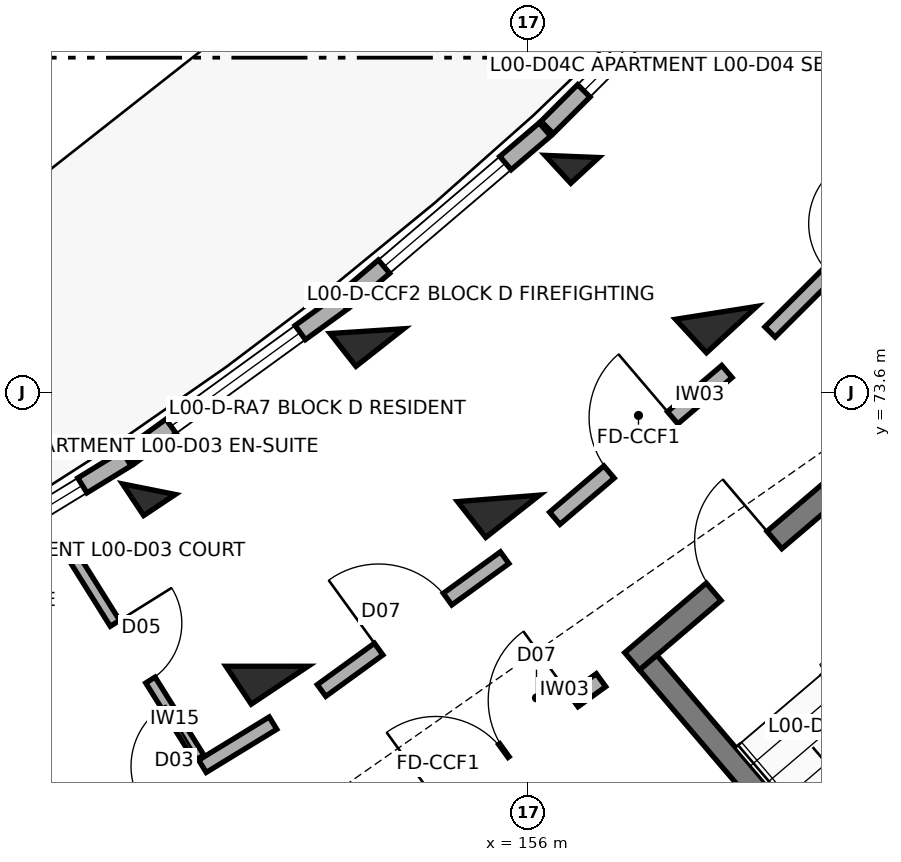
"""IFC4 building model, lengths in metres.
Left out: names, types, materials, properties, quantities, classifications, styles, units other than length and angle.
Written with IfcOpenShell. Run it as: python <this file> out.ifc"""

import sys

from ifc_helpers import new_model, si_unit, direction, frame, frame_2d, origin, origin_2d, place, context, subcontext, project, spatial, rectangle, extrude, element, fill, save


model = new_model("IFC4")
c1 = context("Model", 3, precision=1e-05, world=origin(), true_north=direction((0.0, 1.0)))
c2 = subcontext(c1, "Body", "Model", "MODEL_VIEW")
j1 = project(units=[si_unit("LENGTHUNIT", "METRE"), si_unit("PLANEANGLEUNIT", "RADIAN")], contexts=[c1])
p1 = place(None, origin())
s1 = spatial("IfcSite", under=j1, at=p1, CompositionType="ELEMENT")
p2 = place(p1, origin())
s2 = spatial("IfcBuilding", under=s1, at=p2, CompositionType="ELEMENT")
p3 = place(p2, origin())
s3 = spatial("IfcBuildingStorey", under=s2, at=p3, CompositionType="ELEMENT", Elevation=0.0)
p4 = place(p3, frame((149.358, 68.03, 0.0), z_axis=(0.0, 0.0, 1.0), x_axis=(0.487859659139, -0.87292207727, 0.0)))
e1 = element("IfcColumn", 1, at=p4, inside=s3, PredefinedType="COLUMN", context=c2, shape_type="SweptSolid", body=[
    extrude(rectangle(XDim=0.6, YDim=0.9, at=origin_2d()), origin(), (0.0, 0.0, 1.0), 4.5),
])
p5 = place(p3, frame((151.015, 72.322, 0.0), z_axis=(0.0, 0.0, 1.0), x_axis=(0.554844427448, -0.83195412213, 0.0)))
e2 = element("IfcColumn", 2, at=p5, inside=s3, PredefinedType="COLUMN", context=c2, shape_type="SweptSolid", body=[
    extrude(rectangle(XDim=0.5, YDim=0.5, at=origin_2d()), origin(), (0.0, 0.0, 1.0), 4.5),
])
p6 = place(p3, frame((152.568, 69.993, 0.0), z_axis=(0.0, 0.0, 1.0), x_axis=(0.554844427448, -0.83195412213, 0.0)))
e3 = element("IfcColumn", 3, at=p6, inside=s3, PredefinedType="COLUMN", context=c2, shape_type="SweptSolid", body=[
    extrude(rectangle(XDim=0.6, YDim=0.9, at=origin_2d()), origin(), (0.0, 0.0, 1.0), 4.5),
])
p7 = place(p3, frame((153.883, 74.402, 0.0), z_axis=(0.0, 0.0, 1.0), x_axis=(0.618408395358, -0.785856893175, 0.0)))
e4 = element("IfcColumn", 4, at=p7, inside=s3, PredefinedType="COLUMN", context=c2, shape_type="SweptSolid", body=[
    extrude(rectangle(XDim=0.55, YDim=0.8, at=origin_2d()), origin(), (0.0, 0.0, 1.0), 4.5),
])
p8 = place(p3, frame((155.614, 72.202, 0.0), z_axis=(0.0, 0.0, 1.0), x_axis=(0.618408395358, -0.785856893175, 0.0)))
e5 = element("IfcColumn", 5, at=p8, inside=s3, PredefinedType="COLUMN", context=c2, shape_type="SweptSolid", body=[
    extrude(rectangle(XDim=0.6, YDim=0.9, at=origin_2d()), origin(), (0.0, 0.0, 1.0), 4.5),
])
p9 = place(p3, frame((156.579, 76.701, 0.0), z_axis=(0.0, 0.0, 1.0), x_axis=(0.678159669868, -0.73491459515, 0.0)))
e6 = element("IfcColumn", 6, at=p9, inside=s3, PredefinedType="COLUMN", context=c2, shape_type="SweptSolid", body=[
    extrude(rectangle(XDim=0.5, YDim=0.5, at=origin_2d()), origin(), (0.0, 0.0, 1.0), 4.5),
])
p10 = place(p3, frame((158.477, 74.643, 0.0), z_axis=(0.0, 0.0, 1.0), x_axis=(0.678159669868, -0.73491459515, 0.0)))
e7 = element("IfcColumn", 7, at=p10, inside=s3, PredefinedType="COLUMN", context=c2, shape_type="SweptSolid", body=[
    extrude(rectangle(XDim=0.6, YDim=0.9, at=origin_2d()), origin(), (0.0, 0.0, 1.0), 4.5),
])
p11 = place(p3, frame((147.765, 70.921, 0.0), z_axis=(0.0, 0.0, 1.0), x_axis=(0.85310231885, 0.521743647371, 0.0)))
e8 = element("IfcWall", 8, at=p11, inside=s3, PredefinedType="SOLIDWALL", context=c2, shape_type="SweptSolid", body=[
    extrude(rectangle(XDim=3.464, YDim=0.23, at=frame_2d((1.732, 0.0))), origin(), (0.0, 0.0, 1.0), 3.45),
])
p12 = place(p11, frame((0.682, 0.0, 0.32)))
e9 = element("IfcOpeningElement", 9, at=p12, cuts=e8, PredefinedType="OPENING", context=c2, shape_type="SweptSolid", body=[
    extrude(rectangle(XDim=2.1, YDim=1.65, at=frame_2d((1.05, 0.825))), frame((0.0, 0.125, 0.0), z_axis=(0.0, -1.0, 0.0), x_axis=(1.0, 0.0, 0.0)), (0.0, 0.0, 1.0), 0.25),
])
p13 = place(p3, frame((150.753, 72.75, 0.0), z_axis=(0.0, 0.0, 1.0), x_axis=(0.809540089106, 0.587064599623, 0.0)))
e10 = element("IfcWall", 10, at=p13, inside=s3, PredefinedType="SOLIDWALL", context=c2, shape_type="SweptSolid", body=[
    extrude(rectangle(XDim=3.463, YDim=0.23, at=frame_2d((1.732, 0.0))), origin(), (0.0, 0.0, 1.0), 3.45),
])
p14 = place(p13, frame((0.682, 0.0, 0.32)))
e11 = element("IfcOpeningElement", 11, at=p14, cuts=e10, PredefinedType="OPENING", context=c2, shape_type="SweptSolid", body=[
    extrude(rectangle(XDim=2.1, YDim=1.65, at=frame_2d((1.05, 0.825))), frame((0.0, 0.125, 0.0), z_axis=(0.0, -1.0, 0.0), x_axis=(1.0, 0.0, 0.0)), (0.0, 0.0, 1.0), 0.25),
])
p15 = place(p3, frame((153.589, 74.808, 0.0), z_axis=(0.0, 0.0, 1.0), x_axis=(0.760985425115, 0.648768974876, 0.0)))
e12 = element("IfcWall", 12, at=p15, inside=s3, PredefinedType="SOLIDWALL", context=c2, shape_type="SweptSolid", body=[
    extrude(rectangle(XDim=3.464, YDim=0.23, at=frame_2d((1.732, 0.0))), origin(), (0.0, 0.0, 1.0), 3.45),
])
p16 = place(p15, frame((0.682, 0.0, 0.32)))
e13 = element("IfcOpeningElement", 13, at=p16, cuts=e12, PredefinedType="OPENING", context=c2, shape_type="SweptSolid", body=[
    extrude(rectangle(XDim=2.1, YDim=1.65, at=frame_2d((1.05, 0.825))), frame((0.0, 0.125, 0.0), z_axis=(0.0, -1.0, 0.0), x_axis=(1.0, 0.0, 0.0)), (0.0, 0.0, 1.0), 0.25),
])
p17 = place(p3, frame((156.254, 77.082, 0.0), z_axis=(0.0, 0.0, 1.0), x_axis=(0.707705680562, 0.70650737413, 0.0)))
e14 = element("IfcWall", 14, at=p17, inside=s3, PredefinedType="SOLIDWALL", context=c2, shape_type="SweptSolid", body=[
    extrude(rectangle(XDim=3.464, YDim=0.23, at=frame_2d((1.732, 0.0))), origin(), (0.0, 0.0, 1.0), 3.45),
])
p18 = place(p17, frame((0.682, 0.0, 0.32)))
e15 = element("IfcOpeningElement", 15, at=p18, cuts=e14, PredefinedType="OPENING", context=c2, shape_type="SweptSolid", body=[
    extrude(rectangle(XDim=2.1, YDim=1.65, at=frame_2d((1.05, 0.825))), frame((0.0, 0.125, 0.0), z_axis=(0.0, -1.0, 0.0), x_axis=(1.0, 0.0, 0.0)), (0.0, 0.0, 1.0), 0.25),
])
p19 = place(p3, frame((159.262, 79.041, 0.0), z_axis=(0.0, 0.0, 1.0), x_axis=(0.733738684326, -0.679431779595, 0.0)))
e16 = element("IfcWall", 16, at=p19, inside=s3, PredefinedType="SOLIDWALL", context=c2, shape_type="SweptSolid", body=[
    extrude(rectangle(XDim=8.2, YDim=0.265, at=frame_2d((4.1, 0.0))), origin(), (0.0, 0.0, 1.0), 3.34),
])
p20 = place(p19, frame((3.49, 0.0, 0.0)))
e17 = element("IfcOpeningElement", 17, at=p20, cuts=e16, PredefinedType="OPENING", context=c2, shape_type="SweptSolid", body=[
    extrude(rectangle(XDim=1.5, YDim=2.2, at=frame_2d((0.75, 1.1))), frame((0.0, 0.142, 0.0), z_axis=(0.0, -1.0, 0.0), x_axis=(1.0, 0.0, 0.0)), (0.0, 0.0, 1.0), 0.285),
])
p21 = place(p3, frame((157.372, 70.058, 0.0), z_axis=(0.0, 0.0, 1.0), x_axis=(0.760990583254, 0.648762924495, 0.0)))
e18 = element("IfcWall", 18, at=p21, inside=s3, PredefinedType="SHEAR", context=c2, shape_type="SweptSolid", body=[
    extrude(rectangle(XDim=3.87, YDim=0.3, at=frame_2d((1.935, 0.0))), origin(), (0.0, 0.0, 1.0), 4.5),
])
p22 = place(p21, frame((1.41, 0.0, 0.0)))
e19 = element("IfcOpeningElement", 19, at=p22, cuts=e18, PredefinedType="OPENING", context=c2, shape_type="SweptSolid", body=[
    extrude(rectangle(XDim=1.05, YDim=2.15, at=frame_2d((0.525, 1.075))), frame((0.0, 0.16, 0.0), z_axis=(0.0, -1.0, 0.0), x_axis=(1.0, 0.0, 0.0)), (0.0, 0.0, 1.0), 0.32),
])
p23 = place(p3, frame((157.583, 70.041, 0.0), z_axis=(0.0, 0.0, 1.0), x_axis=(0.648762810187, -0.760990680704, 0.0)))
e20 = element("IfcWall", 20, at=p23, inside=s3, PredefinedType="SHEAR", context=c2, shape_type="SweptSolid", body=[
    extrude(rectangle(XDim=7.69, YDim=0.3, at=frame_2d((3.845, 0.0))), origin(), (0.0, 0.0, 1.0), 4.5),
])
p24 = place(p3, frame((149.989, 67.619, 0.0), z_axis=(0.0, 0.0, 1.0), x_axis=(0.853121049608, 0.5217130195, 0.0)))
e21 = element("IfcWall", 21, at=p24, inside=s3, PredefinedType="SOLIDWALL", context=c2, shape_type="SweptSolid", body=[
    extrude(rectangle(XDim=3.116, YDim=0.19, at=frame_2d((1.558, 0.0))), origin(), (0.0, 0.0, 1.0), 3.34),
])
p25 = place(p24, frame((1.088, 0.0, 0.0)))
e22 = element("IfcOpeningElement", 22, at=p25, cuts=e21, PredefinedType="OPENING", context=c2, shape_type="SweptSolid", body=[
    extrude(rectangle(XDim=0.94, YDim=2.1, at=frame_2d((0.47, 1.05))), frame((0.0, 0.105, 0.0), z_axis=(0.0, -1.0, 0.0), x_axis=(1.0, 0.0, 0.0)), (0.0, 0.0, 1.0), 0.21),
])
p26 = place(p3, frame((149.926, 71.583, 0.0), z_axis=(0.0, 0.0, 1.0), x_axis=(0.5303779416, -0.847761310196, 0.0)))
e23 = element("IfcWall", 23, at=p26, inside=s3, PredefinedType="PARTITIONING", context=c2, shape_type="SweptSolid", body=[
    extrude(rectangle(XDim=3.3, YDim=0.145, at=frame_2d((1.65, 0.0))), origin(), (0.0, 0.0, 1.0), 3.34),
])
p27 = place(p26, frame((1.21, 0.0, 0.0)))
e24 = element("IfcOpeningElement", 24, at=p27, cuts=e23, PredefinedType="OPENING", context=c2, shape_type="SweptSolid", body=[
    extrude(rectangle(XDim=0.88, YDim=2.1, at=frame_2d((0.44, 1.05))), frame((0.0, 0.083, 0.0), z_axis=(0.0, -1.0, 0.0), x_axis=(1.0, 0.0, 0.0)), (0.0, 0.0, 1.0), 0.165),
])
p28 = place(p3, frame((154.423, 67.968, 0.0), z_axis=(0.0, 0.0, 1.0), x_axis=(0.809516127005, 0.587097641043, 0.0)))
e25 = element("IfcWall", 25, at=p28, inside=s3, PredefinedType="SOLIDWALL", context=c2, shape_type="SweptSolid", body=[
    extrude(rectangle(XDim=3.137, YDim=0.21, at=frame_2d((1.569, 0.0))), origin(), (0.0, 0.0, 1.0), 3.34),
])
p29 = place(p28, frame((0.45, 0.0, 0.0)))
e26 = element("IfcOpeningElement", 26, at=p29, cuts=e25, PredefinedType="OPENING", context=c2, shape_type="SweptSolid", body=[
    extrude(rectangle(XDim=1.1, YDim=2.15, at=frame_2d((0.55, 1.075))), frame((0.0, 0.115, 0.0), z_axis=(0.0, -1.0, 0.0), x_axis=(1.0, 0.0, 0.0)), (0.0, 0.0, 1.0), 0.23),
])
p30 = place(p28, frame((1.567, 0.0, 0.0)))
e27 = element("IfcOpeningElement", 27, at=p30, cuts=e25, PredefinedType="OPENING", context=c2, shape_type="SweptSolid", body=[
    extrude(rectangle(XDim=1.12, YDim=2.15, at=frame_2d((0.56, 1.075))), frame((0.0, 0.115, 0.0), z_axis=(0.0, -1.0, 0.0), x_axis=(1.0, 0.0, 0.0)), (0.0, 0.0, 1.0), 0.23),
])
p31 = place(p3, frame((153.285, 69.674, 0.0), z_axis=(0.0, 0.0, 1.0), x_axis=(0.809505174959, 0.587112741911, 0.0)))
e28 = element("IfcWall", 28, at=p31, inside=s3, PredefinedType="SOLIDWALL", context=c2, shape_type="SweptSolid", body=[
    extrude(rectangle(XDim=2.976, YDim=0.19, at=frame_2d((1.488, 0.0))), origin(), (0.0, 0.0, 1.0), 3.34),
])
p32 = place(p31, frame((0.928, 0.0, 0.0)))
e29 = element("IfcOpeningElement", 29, at=p32, cuts=e28, PredefinedType="OPENING", context=c2, shape_type="SweptSolid", body=[
    extrude(rectangle(XDim=1.12, YDim=2.15, at=frame_2d((0.56, 1.075))), frame((0.0, 0.105, 0.0), z_axis=(0.0, -1.0, 0.0), x_axis=(1.0, 0.0, 0.0)), (0.0, 0.0, 1.0), 0.21),
])
p33 = place(p3, frame((156.354, 71.94, 0.0), z_axis=(0.0, 0.0, 1.0), x_axis=(0.760991187621, 0.648762215579, 0.0)))
e30 = element("IfcWall", 30, at=p33, inside=s3, PredefinedType="SOLIDWALL", context=c2, shape_type="SweptSolid", body=[
    extrude(rectangle(XDim=2.976, YDim=0.21, at=frame_2d((1.488, 0.0))), origin(), (0.0, 0.0, 1.0), 3.34),
])
p34 = place(p33, frame((0.938, 0.0, 0.0)))
e31 = element("IfcOpeningElement", 31, at=p34, cuts=e30, PredefinedType="OPENING", context=c2, shape_type="SweptSolid", body=[
    extrude(rectangle(XDim=1.1, YDim=2.15, at=frame_2d((0.55, 1.075))), frame((0.0, 0.115, 0.0), z_axis=(0.0, -1.0, 0.0), x_axis=(1.0, 0.0, 0.0)), (0.0, 0.0, 1.0), 0.23),
])
p35 = place(p3, frame((159.186, 74.39, 0.0), z_axis=(0.0, 0.0, 1.0), x_axis=(0.70773330139, 0.706479705373, 0.0)))
e32 = element("IfcWall", 32, at=p35, inside=s3, PredefinedType="SOLIDWALL", context=c2, shape_type="SweptSolid", body=[
    extrude(rectangle(XDim=3.116, YDim=0.19, at=frame_2d((1.558, 0.0))), origin(), (0.0, 0.0, 1.0), 3.34),
])
p36 = place(p35, frame((1.098, 0.0, 0.0)))
e33 = element("IfcOpeningElement", 33, at=p36, cuts=e32, PredefinedType="OPENING", context=c2, shape_type="SweptSolid", body=[
    extrude(rectangle(XDim=0.92, YDim=2.1, at=frame_2d((0.46, 1.05))), frame((0.0, 0.105, 0.0), z_axis=(0.0, -1.0, 0.0), x_axis=(1.0, 0.0, 0.0)), (0.0, 0.0, 1.0), 0.21),
])
p37 = place(p12, origin())
e34 = element("IfcWindow", 34, at=p37, inside=s3, PartitioningType="TRIPLE_PANEL_VERTICAL", PredefinedType="WINDOW", context=c2, shape_type="SweptSolid", body=[
    extrude(rectangle(XDim=2.1, YDim=1.65, at=frame_2d((1.05, 0.825))), frame((0.0, 0.03, 0.0), z_axis=(0.0, -1.0, 0.0), x_axis=(1.0, 0.0, 0.0)), (0.0, 0.0, 1.0), 0.06),
])
fill(e9, e34)
p38 = place(p14, origin())
e35 = element("IfcWindow", 35, at=p38, inside=s3, PartitioningType="TRIPLE_PANEL_VERTICAL", PredefinedType="WINDOW", context=c2, shape_type="SweptSolid", body=[
    extrude(rectangle(XDim=2.1, YDim=1.65, at=frame_2d((1.05, 0.825))), frame((0.0, 0.03, 0.0), z_axis=(0.0, -1.0, 0.0), x_axis=(1.0, 0.0, 0.0)), (0.0, 0.0, 1.0), 0.06),
])
fill(e11, e35)
p39 = place(p16, origin())
e36 = element("IfcWindow", 36, at=p39, inside=s3, PartitioningType="TRIPLE_PANEL_VERTICAL", PredefinedType="WINDOW", context=c2, shape_type="SweptSolid", body=[
    extrude(rectangle(XDim=2.1, YDim=1.65, at=frame_2d((1.05, 0.825))), frame((0.0, 0.03, 0.0), z_axis=(0.0, -1.0, 0.0), x_axis=(1.0, 0.0, 0.0)), (0.0, 0.0, 1.0), 0.06),
])
fill(e13, e36)
p40 = place(p18, origin())
e37 = element("IfcWindow", 37, at=p40, inside=s3, PartitioningType="TRIPLE_PANEL_VERTICAL", PredefinedType="WINDOW", context=c2, shape_type="SweptSolid", body=[
    extrude(rectangle(XDim=2.1, YDim=1.65, at=frame_2d((1.05, 0.825))), frame((0.0, 0.03, 0.0), z_axis=(0.0, -1.0, 0.0), x_axis=(1.0, 0.0, 0.0)), (0.0, 0.0, 1.0), 0.06),
])
fill(e15, e37)
p41 = place(p22, origin())
e38 = element("IfcDoor", 38, at=p41, inside=s3, OperationType="SINGLE_SWING_RIGHT", PredefinedType="DOOR", context=c2, shape_type="SweptSolid", body=[
    extrude(rectangle(XDim=1.05, YDim=2.15, at=frame_2d((0.525, 1.075))), frame((0.0, 0.025, 0.0), z_axis=(0.0, -1.0, 0.0), x_axis=(1.0, 0.0, 0.0)), (0.0, 0.0, 1.0), 0.05),
])
fill(e19, e38)
p42 = place(p25, origin())
e39 = element("IfcDoor", 39, at=p42, inside=s3, OperationType="SINGLE_SWING_RIGHT", PredefinedType="DOOR", context=c2, shape_type="SweptSolid", body=[
    extrude(rectangle(XDim=0.94, YDim=2.1, at=frame_2d((0.47, 1.05))), frame((0.0, 0.025, 0.0), z_axis=(0.0, -1.0, 0.0), x_axis=(1.0, 0.0, 0.0)), (0.0, 0.0, 1.0), 0.05),
])
fill(e22, e39)
p43 = place(p27, origin())
e40 = element("IfcDoor", 40, at=p43, inside=s3, OperationType="SINGLE_SWING_LEFT", PredefinedType="DOOR", context=c2, shape_type="SweptSolid", body=[
    extrude(rectangle(XDim=0.88, YDim=2.1, at=frame_2d((0.44, 1.05))), frame((0.0, 0.025, 0.0), z_axis=(0.0, -1.0, 0.0), x_axis=(1.0, 0.0, 0.0)), (0.0, 0.0, 1.0), 0.05),
])
fill(e24, e40)
p44 = place(p29, origin())
e41 = element("IfcDoor", 41, at=p44, inside=s3, OperationType="SINGLE_SWING_LEFT", PredefinedType="DOOR", context=c2, shape_type="SweptSolid", body=[
    extrude(rectangle(XDim=1.1, YDim=2.15, at=frame_2d((0.55, 1.075))), frame((0.0, 0.025, 0.0), z_axis=(0.0, -1.0, 0.0), x_axis=(1.0, 0.0, 0.0)), (0.0, 0.0, 1.0), 0.05),
])
fill(e26, e41)
p45 = place(p30, origin())
e42 = element("IfcDoor", 42, at=p45, inside=s3, OperationType="SINGLE_SWING_RIGHT", PredefinedType="DOOR", context=c2, shape_type="SweptSolid", body=[
    extrude(rectangle(XDim=1.12, YDim=2.15, at=frame_2d((0.56, 1.075))), frame((0.0, 0.025, 0.0), z_axis=(0.0, -1.0, 0.0), x_axis=(1.0, 0.0, 0.0)), (0.0, 0.0, 1.0), 0.05),
])
fill(e27, e42)
p46 = place(p32, origin())
e43 = element("IfcDoor", 43, at=p46, inside=s3, OperationType="SINGLE_SWING_LEFT", PredefinedType="DOOR", context=c2, shape_type="SweptSolid", body=[
    extrude(rectangle(XDim=1.12, YDim=2.15, at=frame_2d((0.56, 1.075))), frame((0.0, 0.025, 0.0), z_axis=(0.0, -1.0, 0.0), x_axis=(1.0, 0.0, 0.0)), (0.0, 0.0, 1.0), 0.05),
])
fill(e29, e43)
p47 = place(p34, origin())
e44 = element("IfcDoor", 44, at=p47, inside=s3, OperationType="SINGLE_SWING_RIGHT", PredefinedType="DOOR", context=c2, shape_type="SweptSolid", body=[
    extrude(rectangle(XDim=1.1, YDim=2.15, at=frame_2d((0.55, 1.075))), frame((0.0, 0.025, 0.0), z_axis=(0.0, -1.0, 0.0), x_axis=(1.0, 0.0, 0.0)), (0.0, 0.0, 1.0), 0.05),
])
fill(e31, e44)
save(model, sys.argv[1])
